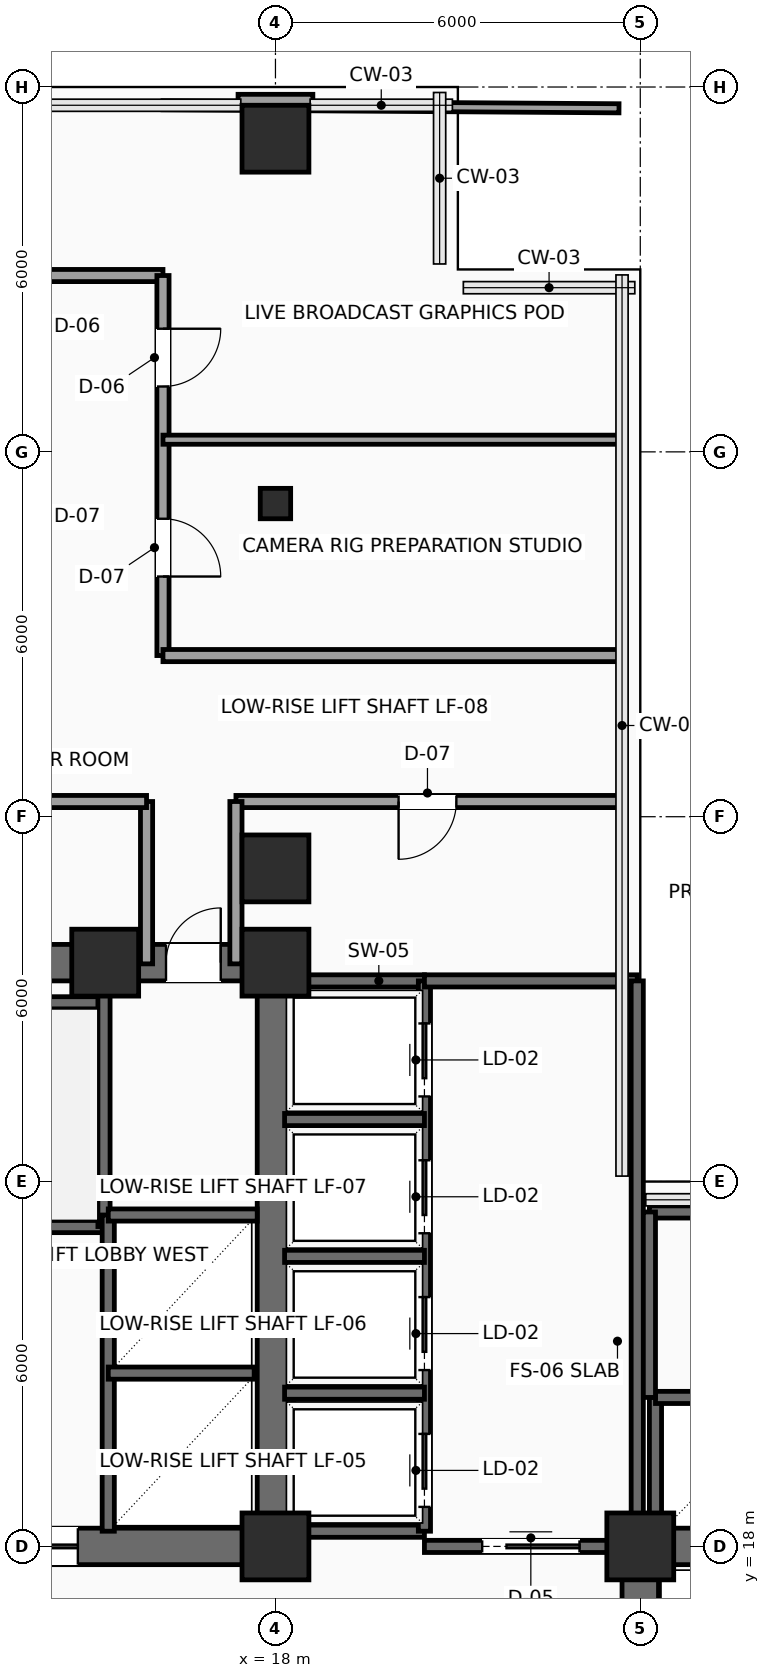
"""IFC4 building model, lengths in metres.
Left out: names, types, materials, properties, quantities, classifications, styles, units other than length and angle.
Written with IfcOpenShell. Run it as: python <this file> out.ifc"""

import sys

from ifc_helpers import new_model, si_unit, direction, frame, frame_2d, origin, origin_2d, place, context, subcontext, project, spatial, rectangle, hollow_rectangle, extrude, element, fill, save


model = new_model("IFC4")
c1 = context("Model", 3, precision=1e-05, world=origin(), true_north=direction((0.0, 1.0)))
c2 = subcontext(c1, "Body", "Model", "MODEL_VIEW")
j1 = project(units=[si_unit("LENGTHUNIT", "METRE"), si_unit("PLANEANGLEUNIT", "RADIAN")], contexts=[c1])
p1 = place(None, origin())
s1 = spatial("IfcSite", under=j1, at=p1, CompositionType="ELEMENT")
p2 = place(p1, origin())
s2 = spatial("IfcBuilding", under=s1, at=p2, CompositionType="ELEMENT")
p3 = place(p2, frame((0.0, 0.0, 107.1)))
s3 = spatial("IfcBuildingStorey", under=s2, at=p3, CompositionType="ELEMENT", Elevation=107.1)
for number, where, z_axis, x_axis in (
    (1, (18.0, 18.0, 0.0), (0.0, 0.0, 1.0), (1.0, 0.0, 0.0)),
    (2, (15.2, 27.6, 0.0), (0.0, 0.0, 1.0), (1.0, 0.0, 0.0)),
    (3, (18.0, 27.6, 0.0), (0.0, 0.0, 1.0), (1.0, 0.0, 0.0)),
    (4, (24.0, 18.0, 0.0), (0.0, 0.0, 1.0), (1.0, 0.0, 0.0)),
    (5, (18.0, 29.15, 0.0), (0.0, 0.0, 1.0), (1.0, 0.0, 0.0)),
):
    element("IfcColumn", number, at=place(p3, frame(where, z_axis=z_axis, x_axis=x_axis)), inside=s3, PredefinedType="COLUMN", context=c2, shape_type="SweptSolid", body=[
        extrude(rectangle(XDim=1.1, YDim=1.1, at=origin_2d()), origin(), (0.0, 0.0, 1.0), 3.75),
    ])
p4 = place(p3, frame((18.0, 35.15, 0.0), z_axis=(0.0, 0.0, 1.0), x_axis=(1.0, 0.0, 0.0)))
e6 = element("IfcColumn", 6, at=p4, inside=s3, PredefinedType="COLUMN", context=c2, shape_type="SweptSolid", body=[
    extrude(hollow_rectangle(XDim=0.5, YDim=0.5, WallThickness=0.025, InnerFilletRadius=0.025, OuterFilletRadius=0.04, at=origin_2d()), origin(), (0.0, 0.0, 1.0), 3.75),
])
p5 = place(p3, frame((18.0, 41.15, 0.0), z_axis=(0.0, 0.0, 1.0), x_axis=(1.0, 0.0, 0.0)))
e7 = element("IfcColumn", 7, at=p5, inside=s3, PredefinedType="COLUMN", context=c2, shape_type="SweptSolid", body=[
    extrude(rectangle(XDim=1.1, YDim=1.1, at=origin_2d()), origin(), (0.0, 0.0, 1.0), 3.75),
])
p6 = place(p3, frame((17.385, 41.76, 0.0), z_axis=(0.0, 0.0, 1.0), x_axis=(1.0, 0.0, 0.0)))
e8 = element("IfcWall", 8, at=p6, inside=s3, PredefinedType="SOLIDWALL", context=c2, shape_type="SweptSolid", body=[
    extrude(rectangle(XDim=1.23, YDim=0.24, at=frame_2d((0.615, 0.0))), origin(), (0.0, 0.0, 1.0), 3.475),
])
p7 = place(p3, frame((6.0, 18.0, 0.0), z_axis=(0.0, 0.0, 1.0), x_axis=(1.0, 0.0, 0.0)))
e9 = element("IfcWall", 9, at=p7, inside=s3, PredefinedType="SHEAR", context=c2, shape_type="SweptSolid", body=[
    extrude(rectangle(XDim=12.0, YDim=0.6, at=frame_2d((6.0, 0.0))), origin(), (0.0, 0.0, 1.0), 3.475),
])
p8 = place(p7, frame((7.15, 0.0, 0.0)))
e10 = element("IfcOpeningElement", 10, at=p8, cuts=e9, PredefinedType="OPENING", context=c2, shape_type="SweptSolid", body=[
    extrude(rectangle(XDim=1.6, YDim=2.3, at=frame_2d((0.8, 1.15))), frame((0.0, 0.31, 0.0), z_axis=(0.0, -1.0, 0.0), x_axis=(1.0, 0.0, 0.0)), (0.0, 0.0, 1.0), 0.62),
])
p9 = place(p3, frame((6.0, 27.6, 0.0), z_axis=(0.0, 0.0, 1.0), x_axis=(1.0, 0.0, 0.0)))
e11 = element("IfcWall", 11, at=p9, inside=s3, PredefinedType="SHEAR", context=c2, shape_type="SweptSolid", body=[
    extrude(rectangle(XDim=12.0, YDim=0.6, at=frame_2d((6.0, 0.0))), origin(), (0.0, 0.0, 1.0), 3.475),
])
p10 = place(p9, frame((10.2, 0.0, 0.0)))
e12 = element("IfcOpeningElement", 12, at=p10, cuts=e11, PredefinedType="OPENING", context=c2, shape_type="SweptSolid", body=[
    extrude(rectangle(XDim=0.9, YDim=2.15, at=frame_2d((0.45, 1.075))), frame((0.0, 0.31, 0.0), z_axis=(0.0, -1.0, 0.0), x_axis=(1.0, 0.0, 0.0)), (0.0, 0.0, 1.0), 0.62),
])
for number, where, z_axis, x_axis in (
    (13, (18.0, 18.0, 0.0), (0.0, 0.0, 1.0), (0.0, 1.0, 0.0)),
    (14, (24.0, 18.0, 0.0), (0.0, 0.0, 1.0), (1.0, 0.0, 0.0)),
):
    element("IfcWall", number, at=place(p3, frame(where, z_axis=z_axis, x_axis=x_axis)), inside=s3, PredefinedType="SHEAR", context=c2, shape_type="SweptSolid", body=[
        extrude(rectangle(XDim=9.6, YDim=0.6, at=frame_2d((4.8, 0.0))), origin(), (0.0, 0.0, 1.0), 3.475),
    ])
p11 = place(p3, frame((24.0, 6.0, 0.0), z_axis=(0.0, 0.0, 1.0), x_axis=(0.0, 1.0, 0.0)))
e15 = element("IfcWall", 15, at=p11, inside=s3, PredefinedType="SHEAR", context=c2, shape_type="SweptSolid", body=[
    extrude(rectangle(XDim=12.0, YDim=0.6, at=frame_2d((6.0, 0.0))), origin(), (0.0, 0.0, 1.0), 3.475),
])
p12 = place(p11, frame((7.15, 0.0, 0.0)))
e16 = element("IfcOpeningElement", 16, at=p12, cuts=e15, PredefinedType="OPENING", context=c2, shape_type="SweptSolid", body=[
    extrude(rectangle(XDim=1.6, YDim=2.3, at=frame_2d((0.8, 1.15))), frame((0.0, 0.31, 0.0), z_axis=(0.0, -1.0, 0.0), x_axis=(1.0, 0.0, 0.0)), (0.0, 0.0, 1.0), 0.62),
])
p13 = place(p3, frame((6.3, 23.26, 0.0), z_axis=(0.0, 0.0, 1.0), x_axis=(1.0, 0.0, 0.0)))
e17 = element("IfcWall", 17, at=p13, inside=s3, PredefinedType="SHEAR", context=c2, shape_type="SweptSolid", body=[
    extrude(rectangle(XDim=8.88, YDim=0.2, at=frame_2d((4.44, 0.0))), origin(), (0.0, 0.0, 1.0), 3.475),
])
p14 = place(p13, frame((0.35, 0.0, 0.0)))
e18 = element("IfcOpeningElement", 18, at=p14, cuts=e17, PredefinedType="OPENING", context=c2, shape_type="SweptSolid", body=[
    extrude(rectangle(XDim=1.1, YDim=2.2, at=frame_2d((0.55, 1.1))), frame((0.0, 0.11, 0.0), z_axis=(0.0, -1.0, 0.0), x_axis=(1.0, 0.0, 0.0)), (0.0, 0.0, 1.0), 0.22),
])
p15 = place(p3, frame((6.3, 26.94, 0.0), z_axis=(0.0, 0.0, 1.0), x_axis=(1.0, 0.0, 0.0)))
e19 = element("IfcWall", 19, at=p15, inside=s3, PredefinedType="SHEAR", context=c2, shape_type="SweptSolid", body=[
    extrude(rectangle(XDim=8.88, YDim=0.2, at=frame_2d((4.44, 0.0))), origin(), (0.0, 0.0, 1.0), 3.475),
])
p16 = place(p3, frame((15.18, 23.26, 0.0), z_axis=(0.0, 0.0, 1.0), x_axis=(0.0, 1.0, 0.0)))
e20 = element("IfcWall", 20, at=p16, inside=s3, PredefinedType="SHEAR", context=c2, shape_type="SweptSolid", body=[
    extrude(rectangle(XDim=4.04, YDim=0.2, at=frame_2d((2.02, 0.0))), origin(), (0.0, 0.0, 1.0), 3.475),
])
p17 = place(p3, frame((15.25, 18.25, 0.0), z_axis=(0.0, 0.0, 1.0), x_axis=(0.0, 1.0, 0.0)))
e21 = element("IfcWall", 21, at=p17, inside=s3, PredefinedType="SHEAR", context=c2, shape_type="SweptSolid", body=[
    extrude(rectangle(XDim=5.2, YDim=0.2, at=frame_2d((2.6, 0.0))), origin(), (0.0, 0.0, 1.0), 3.475),
])
p18 = place(p3, frame((15.25, 20.85, 0.0), z_axis=(0.0, 0.0, 1.0), x_axis=(1.0, 0.0, 0.0)))
e22 = element("IfcWall", 22, at=p18, inside=s3, PredefinedType="SHEAR", context=c2, shape_type="SweptSolid", body=[
    extrude(rectangle(XDim=2.4, YDim=0.2, at=frame_2d((1.2, 0.0))), origin(), (0.0, 0.0, 1.0), 3.475),
])
p19 = place(p3, frame((15.25, 23.45, 0.0), z_axis=(0.0, 0.0, 1.0), x_axis=(1.0, 0.0, 0.0)))
e23 = element("IfcWall", 23, at=p19, inside=s3, PredefinedType="SHEAR", context=c2, shape_type="SweptSolid", body=[
    extrude(rectangle(XDim=2.45, YDim=0.2, at=frame_2d((1.225, 0.0))), origin(), (0.0, 0.0, 1.0), 3.475),
])
for number, where, z_axis, x_axis in (
    (24, (18.1, 27.3, 0.0), (0.0, 0.0, 1.0), (1.0, 0.0, 0.0)),
    (25, (18.1, 18.25, 0.0), (0.0, 0.0, 1.0), (1.0, 0.0, 0.0)),
):
    element("IfcWall", number, at=place(p3, frame(where, z_axis=z_axis, x_axis=x_axis)), inside=s3, PredefinedType="SHEAR", context=c2, shape_type="SweptSolid", body=[
        extrude(rectangle(XDim=2.35, YDim=0.2, at=frame_2d((1.175, 0.0))), origin(), (0.0, 0.0, 1.0), 3.475),
    ])
p20 = place(p3, frame((20.45, 18.25, 0.0), z_axis=(0.0, 0.0, 1.0), x_axis=(0.0, 1.0, 0.0)))
e26 = element("IfcWall", 26, at=p20, inside=s3, PredefinedType="SHEAR", context=c2, shape_type="SweptSolid", body=[
    extrude(rectangle(XDim=9.05, YDim=0.2, at=frame_2d((4.525, 0.0))), origin(), (0.0, 0.0, 1.0), 3.475),
])
p21 = place(p20, frame((0.4, 0.0, 0.0)))
e27 = element("IfcOpeningElement", 27, at=p21, cuts=e26, PredefinedType="OPENING", context=c2, shape_type="SweptSolid", body=[
    extrude(rectangle(XDim=1.2, YDim=2.2, at=frame_2d((0.6, 1.1))), frame((0.0, 0.11, 0.0), z_axis=(0.0, -1.0, 0.0), x_axis=(1.0, 0.0, 0.0)), (0.0, 0.0, 1.0), 0.22),
])
p22 = place(p20, frame((2.65, 0.0, 0.0)))
e28 = element("IfcOpeningElement", 28, at=p22, cuts=e26, PredefinedType="OPENING", context=c2, shape_type="SweptSolid", body=[
    extrude(rectangle(XDim=1.2, YDim=2.2, at=frame_2d((0.6, 1.1))), frame((0.0, 0.11, 0.0), z_axis=(0.0, -1.0, 0.0), x_axis=(1.0, 0.0, 0.0)), (0.0, 0.0, 1.0), 0.22),
])
p23 = place(p20, frame((4.9, 0.0, 0.0)))
e29 = element("IfcOpeningElement", 29, at=p23, cuts=e26, PredefinedType="OPENING", context=c2, shape_type="SweptSolid", body=[
    extrude(rectangle(XDim=1.2, YDim=2.2, at=frame_2d((0.6, 1.1))), frame((0.0, 0.11, 0.0), z_axis=(0.0, -1.0, 0.0), x_axis=(1.0, 0.0, 0.0)), (0.0, 0.0, 1.0), 0.22),
])
p24 = place(p20, frame((7.15, 0.0, 0.0)))
e30 = element("IfcOpeningElement", 30, at=p24, cuts=e26, PredefinedType="OPENING", context=c2, shape_type="SweptSolid", body=[
    extrude(rectangle(XDim=1.2, YDim=2.2, at=frame_2d((0.6, 1.1))), frame((0.0, 0.11, 0.0), z_axis=(0.0, -1.0, 0.0), x_axis=(1.0, 0.0, 0.0)), (0.0, 0.0, 1.0), 0.22),
])
for number, where, z_axis, x_axis in (
    (31, (18.15, 20.52, 0.0), (0.0, 0.0, 1.0), (1.0, 0.0, 0.0)),
    (32, (18.15, 22.77, 0.0), (0.0, 0.0, 1.0), (1.0, 0.0, 0.0)),
    (33, (18.15, 25.02, 0.0), (0.0, 0.0, 1.0), (1.0, 0.0, 0.0)),
):
    element("IfcWall", number, at=place(p3, frame(where, z_axis=z_axis, x_axis=x_axis)), inside=s3, PredefinedType="SHEAR", context=c2, shape_type="SweptSolid", body=[
        extrude(rectangle(XDim=2.3, YDim=0.2, at=frame_2d((1.15, 0.0))), origin(), (0.0, 0.0, 1.0), 3.475),
    ])
p25 = place(p3, frame((20.45, 18.0, 0.0), z_axis=(0.0, 0.0, 1.0), x_axis=(1.0, 0.0, 0.0)))
e34 = element("IfcWall", 34, at=p25, inside=s3, PredefinedType="SHEAR", context=c2, shape_type="SweptSolid", body=[
    extrude(rectangle(XDim=3.5, YDim=0.2, at=frame_2d((1.75, 0.0))), origin(), (0.0, 0.0, 1.0), 3.475),
])
p26 = place(p25, frame((0.95, 0.0, 0.0)))
e35 = element("IfcOpeningElement", 35, at=p26, cuts=e34, PredefinedType="OPENING", context=c2, shape_type="SweptSolid", body=[
    extrude(rectangle(XDim=1.6, YDim=2.3, at=frame_2d((0.8, 1.15))), frame((0.0, 0.11, 0.0), z_axis=(0.0, -1.0, 0.0), x_axis=(1.0, 0.0, 0.0)), (0.0, 0.0, 1.0), 0.22),
])
p27 = place(p3, frame((20.45, 27.3, 0.0), z_axis=(0.0, 0.0, 1.0), x_axis=(1.0, 0.0, 0.0)))
e36 = element("IfcWall", 36, at=p27, inside=s3, PredefinedType="SHEAR", context=c2, shape_type="SweptSolid", body=[
    extrude(rectangle(XDim=3.5, YDim=0.2, at=frame_2d((1.75, 0.0))), origin(), (0.0, 0.0, 1.0), 3.475),
])
p28 = place(p3, frame((23.95, 18.0, 0.0), z_axis=(0.0, 0.0, 1.0), x_axis=(0.0, 1.0, 0.0)))
e37 = element("IfcWall", 37, at=p28, inside=s3, PredefinedType="SHEAR", context=c2, shape_type="SweptSolid", body=[
    extrude(rectangle(XDim=9.3, YDim=0.2, at=frame_2d((4.65, 0.0))), origin(), (0.0, 0.0, 1.0), 3.475),
])
p29 = place(p3, frame((24.25, 18.1, 0.0), z_axis=(0.0, 0.0, 1.0), x_axis=(0.0, 1.0, 0.0)))
e38 = element("IfcWall", 38, at=p29, inside=s3, PredefinedType="SHEAR", context=c2, shape_type="SweptSolid", body=[
    extrude(rectangle(XDim=2.35, YDim=0.2, at=frame_2d((1.175, 0.0))), origin(), (0.0, 0.0, 1.0), 3.475),
])
p30 = place(p3, frame((24.25, 20.45, 0.0), z_axis=(0.0, 0.0, 1.0), x_axis=(1.0, 0.0, 0.0)))
e39 = element("IfcWall", 39, at=p30, inside=s3, PredefinedType="SHEAR", context=c2, shape_type="SweptSolid", body=[
    extrude(rectangle(XDim=9.05, YDim=0.2, at=frame_2d((4.525, 0.0))), origin(), (0.0, 0.0, 1.0), 3.475),
])
p31 = place(p3, frame((24.15, 23.5, 0.0), z_axis=(0.0, 0.0, 1.0), x_axis=(1.0, 0.0, 0.0)))
e40 = element("IfcWall", 40, at=p31, inside=s3, PredefinedType="SHEAR", context=c2, shape_type="SweptSolid", body=[
    extrude(rectangle(XDim=9.15, YDim=0.2, at=frame_2d((4.575, 0.0))), origin(), (0.0, 0.0, 1.0), 3.475),
])
p32 = place(p3, frame((24.15, 20.45, 0.0), z_axis=(0.0, 0.0, 1.0), x_axis=(0.0, 1.0, 0.0)))
e41 = element("IfcWall", 41, at=p32, inside=s3, PredefinedType="SHEAR", context=c2, shape_type="SweptSolid", body=[
    extrude(rectangle(XDim=3.05, YDim=0.2, at=frame_2d((1.525, 0.0))), origin(), (0.0, 0.0, 1.0), 3.475),
])
p33 = place(p3, frame((13.8, 38.9, 0.0), z_axis=(0.0, 0.0, 1.0), x_axis=(1.0, 0.0, 0.0)))
e42 = element("IfcWall", 42, at=p33, inside=s3, PredefinedType="PARTITIONING", context=c2, shape_type="SweptSolid", body=[
    extrude(rectangle(XDim=2.35, YDim=0.2, at=frame_2d((1.175, 0.0))), origin(), (0.0, 0.0, 1.0), 3.475),
])
p34 = place(p3, frame((16.15, 38.9, 0.0), z_axis=(0.0, 0.0, 1.0), x_axis=(0.0, -1.0, 0.0)))
e43 = element("IfcWall", 43, at=p34, inside=s3, PredefinedType="PARTITIONING", context=c2, shape_type="SweptSolid", body=[
    extrude(rectangle(XDim=6.25, YDim=0.2, at=frame_2d((3.125, 0.0))), origin(), (0.0, 0.0, 1.0), 3.475),
])
p35 = place(p34, frame((4.0, 0.0, 0.0)))
e44 = element("IfcOpeningElement", 44, at=p35, cuts=e43, PredefinedType="OPENING", context=c2, shape_type="SweptSolid", body=[
    extrude(rectangle(XDim=0.95, YDim=2.15, at=frame_2d((0.475, 1.075))), frame((0.0, 0.11, 0.0), z_axis=(0.0, -1.0, 0.0), x_axis=(1.0, 0.0, 0.0)), (0.0, 0.0, 1.0), 0.22),
])
p36 = place(p34, frame((0.875, 0.0, 0.0)))
e45 = element("IfcOpeningElement", 45, at=p36, cuts=e43, PredefinedType="OPENING", context=c2, shape_type="SweptSolid", body=[
    extrude(rectangle(XDim=0.95, YDim=2.15, at=frame_2d((0.475, 1.075))), frame((0.0, 0.11, 0.0), z_axis=(0.0, -1.0, 0.0), x_axis=(1.0, 0.0, 0.0)), (0.0, 0.0, 1.0), 0.22),
])
p37 = place(p3, frame((16.15, 32.65, 0.0), z_axis=(0.0, 0.0, 1.0), x_axis=(1.0, 0.0, 0.0)))
e46 = element("IfcWall", 46, at=p37, inside=s3, PredefinedType="PARTITIONING", context=c2, shape_type="SweptSolid", body=[
    extrude(rectangle(XDim=7.55, YDim=0.2, at=frame_2d((3.775, 0.0))), origin(), (0.0, 0.0, 1.0), 3.475),
])
p38 = place(p3, frame((23.7, 30.25, 0.0), z_axis=(0.0, 0.0, 1.0), x_axis=(-1.0, 0.0, 0.0)))
e47 = element("IfcWall", 47, at=p38, inside=s3, PredefinedType="PARTITIONING", context=c2, shape_type="SweptSolid", body=[
    extrude(rectangle(XDim=6.35, YDim=0.2, at=frame_2d((3.175, 0.0))), origin(), (0.0, 0.0, 1.0), 3.475),
])
p39 = place(p38, frame((2.725, 0.0, 0.0)))
e48 = element("IfcOpeningElement", 48, at=p39, cuts=e47, PredefinedType="OPENING", context=c2, shape_type="SweptSolid", body=[
    extrude(rectangle(XDim=0.95, YDim=2.15, at=frame_2d((0.475, 1.075))), frame((0.0, 0.11, 0.0), z_axis=(0.0, -1.0, 0.0), x_axis=(1.0, 0.0, 0.0)), (0.0, 0.0, 1.0), 0.22),
])
for number, where, z_axis, x_axis in (
    (49, (17.35, 30.25, 0.0), (0.0, 0.0, 1.0), (0.0, -1.0, 0.0)),
    (50, (15.88, 27.58, 0.0), (0.0, 0.0, 1.0), (0.0, 1.0, 0.0)),
):
    element("IfcWall", number, at=place(p3, frame(where, z_axis=z_axis, x_axis=x_axis)), inside=s3, PredefinedType="PARTITIONING", context=c2, shape_type="SweptSolid", body=[
        extrude(rectangle(XDim=2.67, YDim=0.2, at=frame_2d((1.335, 0.0))), origin(), (0.0, 0.0, 1.0), 3.475),
    ])
p40 = place(p3, frame((15.88, 30.25, 0.0), z_axis=(0.0, 0.0, 1.0), x_axis=(-1.0, 0.0, 0.0)))
e51 = element("IfcWall", 51, at=p40, inside=s3, PredefinedType="PARTITIONING", context=c2, shape_type="SweptSolid", body=[
    extrude(rectangle(XDim=10.63, YDim=0.2, at=frame_2d((5.315, 0.0))), origin(), (0.0, 0.0, 1.0), 3.475),
])
p41 = place(p40, frame((6.13, 0.0, 0.0)))
e52 = element("IfcOpeningElement", 52, at=p41, cuts=e51, PredefinedType="OPENING", context=c2, shape_type="SweptSolid", body=[
    extrude(rectangle(XDim=0.9, YDim=2.1, at=frame_2d((0.45, 1.05))), frame((0.0, 0.11, 0.0), z_axis=(0.0, -1.0, 0.0), x_axis=(1.0, 0.0, 0.0)), (0.0, 0.0, 1.0), 0.22),
])
p42 = place(p3, frame((16.15, 36.2, 0.0), z_axis=(0.0, 0.0, 1.0), x_axis=(1.0, 0.0, 0.0)))
e53 = element("IfcWall", 53, at=p42, inside=s3, PredefinedType="PARTITIONING", context=c2, shape_type="SweptSolid", body=[
    extrude(rectangle(XDim=7.55, YDim=0.15, at=frame_2d((3.775, 0.0))), origin(), (0.0, 0.0, 1.0), 3.475),
])
p43 = place(p3, frame((16.15, 41.7, 0.0), z_axis=(0.0, 0.0, 1.0), x_axis=(0.99997872573, -0.006522889494, 0.0)))
e54 = element("IfcWall", 54, at=p43, inside=s3, PredefinedType="PARTITIONING", context=c2, shape_type="SweptSolid", body=[
    extrude(rectangle(XDim=1.235, YDim=0.15, at=frame_2d((0.618, 0.0))), origin(), (0.0, 0.0, 1.0), 3.475),
])
p44 = place(p3, frame((18.615, 41.684, 0.0), z_axis=(0.0, 0.0, 1.0), x_axis=(0.999977612278, -0.006691408161, 0.0)))
e55 = element("IfcWall", 55, at=p44, inside=s3, PredefinedType="PARTITIONING", context=c2, shape_type="SweptSolid", body=[
    extrude(rectangle(XDim=5.035, YDim=0.15, at=frame_2d((2.518, 0.0))), origin(), (0.0, 0.0, 1.0), 3.475),
])
p45 = place(p8, origin())
e56 = element("IfcDoor", 56, at=p45, inside=s3, OperationType="DOUBLE_DOOR_SLIDING", PredefinedType="DOOR", context=c2, shape_type="SweptSolid", body=[
    extrude(rectangle(XDim=1.6, YDim=2.3, at=frame_2d((0.8, 1.15))), frame((0.0, 0.025, 0.0), z_axis=(0.0, -1.0, 0.0), x_axis=(1.0, 0.0, 0.0)), (0.0, 0.0, 1.0), 0.05),
])
fill(e10, e56)
p46 = place(p10, origin())
e57 = element("IfcDoor", 57, at=p46, inside=s3, OperationType="SINGLE_SWING_RIGHT", PredefinedType="DOOR", context=c2, shape_type="SweptSolid", body=[
    extrude(rectangle(XDim=0.9, YDim=2.15, at=frame_2d((0.45, 1.075))), frame((0.0, 0.025, 0.0), z_axis=(0.0, -1.0, 0.0), x_axis=(1.0, 0.0, 0.0)), (0.0, 0.0, 1.0), 0.05),
])
fill(e12, e57)
p47 = place(p21, origin())
e58 = element("IfcDoor", 58, at=p47, inside=s3, OperationType="SLIDING_TO_RIGHT", PredefinedType="DOOR", context=c2, shape_type="SweptSolid", body=[
    extrude(rectangle(XDim=1.2, YDim=2.2, at=frame_2d((0.6, 1.1))), frame((0.0, 0.025, 0.0), z_axis=(0.0, -1.0, 0.0), x_axis=(1.0, 0.0, 0.0)), (0.0, 0.0, 1.0), 0.05),
])
fill(e27, e58)
p48 = place(p22, origin())
e59 = element("IfcDoor", 59, at=p48, inside=s3, OperationType="SLIDING_TO_RIGHT", PredefinedType="DOOR", context=c2, shape_type="SweptSolid", body=[
    extrude(rectangle(XDim=1.2, YDim=2.2, at=frame_2d((0.6, 1.1))), frame((0.0, 0.025, 0.0), z_axis=(0.0, -1.0, 0.0), x_axis=(1.0, 0.0, 0.0)), (0.0, 0.0, 1.0), 0.05),
])
fill(e28, e59)
p49 = place(p23, origin())
e60 = element("IfcDoor", 60, at=p49, inside=s3, OperationType="SLIDING_TO_RIGHT", PredefinedType="DOOR", context=c2, shape_type="SweptSolid", body=[
    extrude(rectangle(XDim=1.2, YDim=2.2, at=frame_2d((0.6, 1.1))), frame((0.0, 0.025, 0.0), z_axis=(0.0, -1.0, 0.0), x_axis=(1.0, 0.0, 0.0)), (0.0, 0.0, 1.0), 0.05),
])
fill(e29, e60)
p50 = place(p24, origin())
e61 = element("IfcDoor", 61, at=p50, inside=s3, OperationType="SLIDING_TO_RIGHT", PredefinedType="DOOR", context=c2, shape_type="SweptSolid", body=[
    extrude(rectangle(XDim=1.2, YDim=2.2, at=frame_2d((0.6, 1.1))), frame((0.0, 0.025, 0.0), z_axis=(0.0, -1.0, 0.0), x_axis=(1.0, 0.0, 0.0)), (0.0, 0.0, 1.0), 0.05),
])
fill(e30, e61)
p51 = place(p26, origin())
e62 = element("IfcDoor", 62, at=p51, inside=s3, OperationType="DOUBLE_DOOR_SLIDING", PredefinedType="DOOR", context=c2, shape_type="SweptSolid", body=[
    extrude(rectangle(XDim=1.6, YDim=2.3, at=frame_2d((0.8, 1.15))), frame((0.0, 0.025, 0.0), z_axis=(0.0, -1.0, 0.0), x_axis=(1.0, 0.0, 0.0)), (0.0, 0.0, 1.0), 0.05),
])
fill(e35, e62)
p52 = place(p35, origin())
e63 = element("IfcDoor", 63, at=p52, inside=s3, OperationType="SINGLE_SWING_RIGHT", PredefinedType="DOOR", context=c2, shape_type="SweptSolid", body=[
    extrude(rectangle(XDim=0.95, YDim=2.15, at=frame_2d((0.475, 1.075))), frame((0.0, 0.025, 0.0), z_axis=(0.0, -1.0, 0.0), x_axis=(1.0, 0.0, 0.0)), (0.0, 0.0, 1.0), 0.05),
])
fill(e44, e63)
p53 = place(p36, origin())
e64 = element("IfcDoor", 64, at=p53, inside=s3, OperationType="SINGLE_SWING_LEFT", PredefinedType="DOOR", context=c2, shape_type="SweptSolid", body=[
    extrude(rectangle(XDim=0.95, YDim=2.15, at=frame_2d((0.475, 1.075))), frame((0.0, 0.025, 0.0), z_axis=(0.0, -1.0, 0.0), x_axis=(1.0, 0.0, 0.0)), (0.0, 0.0, 1.0), 0.05),
])
fill(e45, e64)
p54 = place(p39, origin())
e65 = element("IfcDoor", 65, at=p54, inside=s3, OperationType="SINGLE_SWING_RIGHT", PredefinedType="DOOR", context=c2, shape_type="SweptSolid", body=[
    extrude(rectangle(XDim=0.95, YDim=2.15, at=frame_2d((0.475, 1.075))), frame((0.0, 0.025, 0.0), z_axis=(0.0, -1.0, 0.0), x_axis=(1.0, 0.0, 0.0)), (0.0, 0.0, 1.0), 0.05),
])
fill(e48, e65)
save(model, sys.argv[1])
